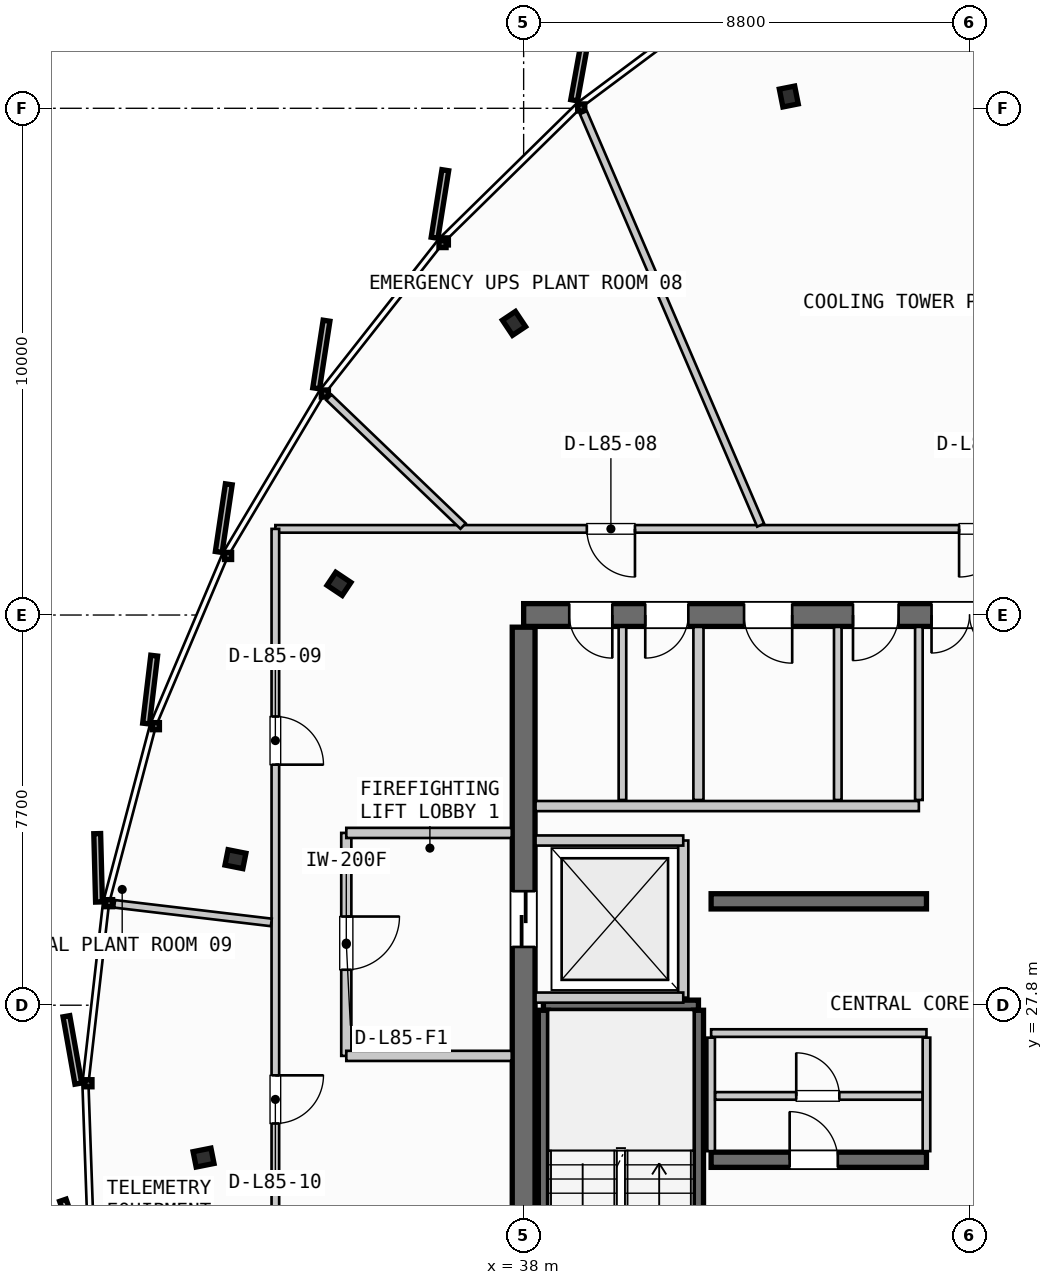
"""IFC4 building model, lengths in metres.
Left out: names, types, materials, properties, quantities, classifications, styles, units other than length and angle.
Written with IfcOpenShell. Run it as: python <this file> out.ifc"""

import sys

from ifc_helpers import new_model, si_unit, direction, frame, frame_2d, origin, origin_2d, place, context, subcontext, project, spatial, rectangle, i_section, extrude, source, transform, mapped, element, fill, save


model = new_model("IFC4")
c1 = context("Model", 3, precision=1e-05, world=origin(), true_north=direction((0.0, 1.0)))
c2 = subcontext(c1, "Body", "Model", "MODEL_VIEW")
j1 = project(units=[si_unit("LENGTHUNIT", "METRE"), si_unit("PLANEANGLEUNIT", "RADIAN")], contexts=[c1])
p1 = place(None, origin())
s1 = spatial("IfcSite", under=j1, at=p1, CompositionType="ELEMENT")
p2 = place(p1, origin())
s2 = spatial("IfcBuilding", under=s1, at=p2, CompositionType="ELEMENT")
p3 = place(p2, frame((0.0, 0.0, 320.3)))
s3 = spatial("IfcBuildingStorey", under=s2, at=p3, CompositionType="ELEMENT", Elevation=320.3)
p4 = place(p3, frame((55.6, 35.5, 0.0), z_axis=(0.0, 0.0, 1.0), x_axis=(-1.0, 0.0, 0.0)))
e1 = element("IfcWall", 1, at=p4, inside=s3, PredefinedType="SHEAR", context=c2, shape_type="SweptSolid", body=[
    extrude(rectangle(XDim=17.6, YDim=0.45, at=frame_2d((8.8, 0.0))), origin(), (0.0, 0.0, 1.0), 3.735),
])
p5 = place(p4, frame((8.05, 0.0, 0.0)))
e2 = element("IfcOpeningElement", 2, at=p5, cuts=e1, PredefinedType="OPENING", context=c2, shape_type="SweptSolid", body=[
    extrude(rectangle(XDim=1.5, YDim=2.2, at=frame_2d((0.75, 1.1))), frame((0.0, 0.235, 0.0), z_axis=(0.0, -1.0, 0.0), x_axis=(1.0, 0.0, 0.0)), (0.0, 0.0, 1.0), 0.47),
])
p6 = place(p4, frame((15.85, 0.0, 0.0)))
e3 = element("IfcOpeningElement", 3, at=p6, cuts=e1, PredefinedType="OPENING", context=c2, shape_type="SweptSolid", body=[
    extrude(rectangle(XDim=0.85, YDim=2.15, at=frame_2d((0.425, 1.075))), frame((0.0, 0.235, 0.0), z_axis=(0.0, -1.0, 0.0), x_axis=(1.0, 0.0, 0.0)), (0.0, 0.0, 1.0), 0.47),
])
p7 = place(p4, frame((14.35, 0.0, 0.0)))
e4 = element("IfcOpeningElement", 4, at=p7, cuts=e1, PredefinedType="OPENING", context=c2, shape_type="SweptSolid", body=[
    extrude(rectangle(XDim=0.85, YDim=2.15, at=frame_2d((0.425, 1.075))), frame((0.0, 0.235, 0.0), z_axis=(0.0, -1.0, 0.0), x_axis=(1.0, 0.0, 0.0)), (0.0, 0.0, 1.0), 0.47),
])
p8 = place(p4, frame((12.3, 0.0, 0.0)))
e5 = element("IfcOpeningElement", 5, at=p8, cuts=e1, PredefinedType="OPENING", context=c2, shape_type="SweptSolid", body=[
    extrude(rectangle(XDim=0.95, YDim=2.15, at=frame_2d((0.475, 1.075))), frame((0.0, 0.235, 0.0), z_axis=(0.0, -1.0, 0.0), x_axis=(1.0, 0.0, 0.0)), (0.0, 0.0, 1.0), 0.47),
])
p9 = place(p4, frame((10.2, 0.0, 0.0)))
e6 = element("IfcOpeningElement", 6, at=p9, cuts=e1, PredefinedType="OPENING", context=c2, shape_type="SweptSolid", body=[
    extrude(rectangle(XDim=0.9, YDim=2.15, at=frame_2d((0.45, 1.075))), frame((0.0, 0.235, 0.0), z_axis=(0.0, -1.0, 0.0), x_axis=(1.0, 0.0, 0.0)), (0.0, 0.0, 1.0), 0.47),
])
p10 = place(p3, frame((38.0, 35.26, 0.0), z_axis=(0.0, 0.0, 1.0), x_axis=(0.0, -1.0, 0.0)))
e7 = element("IfcWall", 7, at=p10, inside=s3, PredefinedType="SHEAR", context=c2, shape_type="SweptSolid", body=[
    extrude(rectangle(XDim=14.92, YDim=0.45, at=frame_2d((7.46, 0.0))), origin(), (0.0, 0.0, 1.0), 3.735),
])
p11 = place(p10, frame((5.21, 0.0, 0.0)))
e8 = element("IfcOpeningElement", 8, at=p11, cuts=e7, PredefinedType="OPENING", context=c2, shape_type="SweptSolid", body=[
    extrude(rectangle(XDim=1.1, YDim=2.2, at=frame_2d((0.55, 1.1))), frame((0.0, 0.235, 0.0), z_axis=(0.0, -1.0, 0.0), x_axis=(1.0, 0.0, 0.0)), (0.0, 0.0, 1.0), 0.47),
])
p12 = place(p3, frame((41.7, 24.75, 0.0), z_axis=(0.0, 0.0, 1.0), x_axis=(1.0, 0.0, 0.0)))
e9 = element("IfcWall", 9, at=p12, inside=s3, PredefinedType="SHEAR", context=c2, shape_type="SweptSolid", body=[
    extrude(rectangle(XDim=4.25, YDim=0.3, at=frame_2d((2.125, 0.0))), origin(), (0.0, 0.0, 1.0), 3.735),
])
p13 = place(p12, frame((1.55, 0.0, 0.0)))
e10 = element("IfcOpeningElement", 10, at=p13, cuts=e9, PredefinedType="OPENING", context=c2, shape_type="SweptSolid", body=[
    extrude(rectangle(XDim=0.95, YDim=2.15, at=frame_2d((0.475, 1.075))), frame((0.0, 0.16, 0.0), z_axis=(0.0, -1.0, 0.0), x_axis=(1.0, 0.0, 0.0)), (0.0, 0.0, 1.0), 0.32),
])
p14 = place(p3, frame((41.7, 29.85, 0.0), z_axis=(0.0, 0.0, 1.0), x_axis=(1.0, 0.0, 0.0)))
e11 = element("IfcWall", 11, at=p14, inside=s3, PredefinedType="SHEAR", context=c2, shape_type="SweptSolid", body=[
    extrude(rectangle(XDim=4.25, YDim=0.3, at=frame_2d((2.125, 0.0))), origin(), (0.0, 0.0, 1.0), 3.735),
])
m1 = source(origin(), c2, "Body", "SweptSolid", [
    extrude(i_section(OverallWidth=0.309, OverallDepth=0.359, WebThickness=0.016, FlangeThickness=0.026, FilletRadius=0.027, at=origin_2d()), origin(), (0.0, 0.0, 1.0), 3.735),
])
for number, where, z_axis, x_axis in (
    (12, (43.233, 45.732, 0.0), (0.0, 0.0, 1.0), (-0.195, 0.981, 0.0)),
    (13, (37.81, 41.255, 0.0), (0.0, 0.0, 1.0), (-0.556, 0.831, 0.0)),
    (14, (34.356, 36.115, 0.0), (0.0, 0.0, 1.0), (-0.831, 0.556, 0.0)),
    (15, (32.312, 30.682, 0.0), (0.0, 0.0, 1.0), (-0.981, 0.195, 0.0)),
    (16, (31.683, 24.793, 0.0), (0.0, 0.0, 1.0), (-0.981, -0.195, 0.0)),
):
    element("IfcColumn", number, at=place(p3, frame(where, z_axis=z_axis, x_axis=x_axis)), inside=s3, PredefinedType="COLUMN", context=c2, shape_type="MappedRepresentation", body=[
        mapped(m1, transform((0.0, 0.0, 0.0), scale=1.0)),
    ])
p15 = place(p3, frame((38.39, 27.8, 0.0), z_axis=(0.0, 0.0, 1.0), x_axis=(1.0, 0.0, 0.0)))
e17 = element("IfcWall", 17, at=p15, inside=s3, PredefinedType="SHEAR", context=c2, shape_type="SweptSolid", body=[
    extrude(rectangle(XDim=3.06, YDim=0.2, at=frame_2d((1.53, 0.0))), origin(), (0.0, 0.0, 1.0), 3.735),
])
for number, where, z_axis, x_axis in (
    (18, (41.45, 27.7, 0.0), (0.0, 0.0, 1.0), (0.0, -1.0, 0.0)),
    (19, (38.39, 20.35, 0.0), (0.0, 0.0, 1.0), (0.0, 1.0, 0.0)),
):
    element("IfcWall", number, at=place(p3, frame(where, z_axis=z_axis, x_axis=x_axis)), inside=s3, PredefinedType="SHEAR", context=c2, shape_type="SweptSolid", body=[
        extrude(rectangle(XDim=7.35, YDim=0.2, at=frame_2d((3.675, 0.0))), origin(), (0.0, 0.0, 1.0), 3.735),
    ])
p16 = place(p3, frame((41.15, 27.95, 0.0), z_axis=(0.0, 0.0, 1.0), x_axis=(0.0, 1.0, 0.0)))
e20 = element("IfcWall", 20, at=p16, inside=s3, PredefinedType="PARTITIONING", context=c2, shape_type="SweptSolid", body=[
    extrude(rectangle(XDim=3.1, YDim=0.2, at=frame_2d((1.55, 0.0))), origin(), (0.0, 0.0, 1.0), 3.26),
])
for number, where, z_axis, x_axis in (
    (21, (38.235, 27.95, 0.0), (0.0, 0.0, 1.0), (1.0, 0.0, 0.0)),
    (22, (38.235, 31.05, 0.0), (0.0, 0.0, 1.0), (1.0, 0.0, 0.0)),
):
    element("IfcWall", number, at=place(p3, frame(where, z_axis=z_axis, x_axis=x_axis)), inside=s3, PredefinedType="PARTITIONING", context=c2, shape_type="SweptSolid", body=[
        extrude(rectangle(XDim=2.915, YDim=0.2, at=frame_2d((1.458, 0.0))), origin(), (0.0, 0.0, 1.0), 3.26),
    ])
p17 = place(p3, frame((34.5, 31.2, 0.0), z_axis=(0.0, 0.0, 1.0), x_axis=(0.0, -1.0, 0.0)))
e23 = element("IfcWall", 23, at=p17, inside=s3, PredefinedType="PARTITIONING", context=c2, shape_type="SweptSolid", body=[
    extrude(rectangle(XDim=4.4, YDim=0.2, at=frame_2d((2.2, 0.0))), origin(), (0.0, 0.0, 1.0), 3.26),
])
p18 = place(p17, frame((1.65, 0.0, 0.0)))
e24 = element("IfcOpeningElement", 24, at=p18, cuts=e23, PredefinedType="OPENING", context=c2, shape_type="SweptSolid", body=[
    extrude(rectangle(XDim=1.05, YDim=2.15, at=frame_2d((0.525, 1.075))), frame((0.0, 0.11, 0.0), z_axis=(0.0, -1.0, 0.0), x_axis=(1.0, 0.0, 0.0)), (0.0, 0.0, 1.0), 0.22),
])
for number, where, z_axis, x_axis in (
    (25, (34.5, 26.8, 0.0), (0.0, 0.0, 1.0), (1.0, 0.0, 0.0)),
    (26, (34.5, 31.2, 0.0), (0.0, 0.0, 1.0), (1.0, 0.0, 0.0)),
):
    element("IfcWall", number, at=place(p3, frame(where, z_axis=z_axis, x_axis=x_axis)), inside=s3, PredefinedType="PARTITIONING", context=c2, shape_type="SweptSolid", body=[
        extrude(rectangle(XDim=3.265, YDim=0.2, at=frame_2d((1.632, 0.0))), origin(), (0.0, 0.0, 1.0), 3.26),
    ])
p19 = place(p3, frame((41.7, 27.25, 0.0), z_axis=(0.0, 0.0, 1.0), x_axis=(1.0, 0.0, 0.0)))
e27 = element("IfcWall", 27, at=p19, inside=s3, PredefinedType="PARTITIONING", context=c2, shape_type="SweptSolid", body=[
    extrude(rectangle(XDim=4.25, YDim=0.15, at=frame_2d((2.125, 0.0))), origin(), (0.0, 0.0, 1.0), 3.26),
])
for number, where, z_axis, x_axis in (
    (28, (41.7, 24.92, 0.0), (0.0, 0.0, 1.0), (0.0, 1.0, 0.0)),
    (29, (45.95, 24.92, 0.0), (0.0, 0.0, 1.0), (0.0, 1.0, 0.0)),
):
    element("IfcWall", number, at=place(p3, frame(where, z_axis=z_axis, x_axis=x_axis)), inside=s3, PredefinedType="PARTITIONING", context=c2, shape_type="SweptSolid", body=[
        extrude(rectangle(XDim=2.24, YDim=0.15, at=frame_2d((1.12, 0.0))), origin(), (0.0, 0.0, 1.0), 3.26),
    ])
p20 = place(p3, frame((41.78, 26.01, 0.0), z_axis=(0.0, 0.0, 1.0), x_axis=(1.0, 0.0, 0.0)))
e30 = element("IfcWall", 30, at=p20, inside=s3, PredefinedType="PARTITIONING", context=c2, shape_type="SweptSolid", body=[
    extrude(rectangle(XDim=4.09, YDim=0.15, at=frame_2d((2.045, 0.0))), origin(), (0.0, 0.0, 1.0), 3.26),
])
p21 = place(p20, frame((1.6, 0.0, 0.0)))
e31 = element("IfcOpeningElement", 31, at=p21, cuts=e30, PredefinedType="OPENING", context=c2, shape_type="SweptSolid", body=[
    extrude(rectangle(XDim=0.85, YDim=2.15, at=frame_2d((0.425, 1.075))), frame((0.0, 0.085, 0.0), z_axis=(0.0, -1.0, 0.0), x_axis=(1.0, 0.0, 0.0)), (0.0, 0.0, 1.0), 0.17),
])
p22 = place(p3, frame((41.45, 31.85, 0.0), z_axis=(0.0, 0.0, 1.0), x_axis=(0.0, 1.0, 0.0)))
e32 = element("IfcWall", 32, at=p22, inside=s3, PredefinedType="PARTITIONING", context=c2, shape_type="SweptSolid", body=[
    extrude(rectangle(XDim=3.415, YDim=0.2, at=frame_2d((1.708, 0.0))), origin(), (0.0, 0.0, 1.0), 3.26),
])
p23 = place(p3, frame((38.235, 31.73, 0.0), z_axis=(0.0, 0.0, 1.0), x_axis=(1.0, 0.0, 0.0)))
e33 = element("IfcWall", 33, at=p23, inside=s3, PredefinedType="PARTITIONING", context=c2, shape_type="SweptSolid", body=[
    extrude(rectangle(XDim=7.565, YDim=0.2, at=frame_2d((3.782, 0.0))), origin(), (0.0, 0.0, 1.0), 3.26),
])
for number, where, z_axis, x_axis in (
    (34, (45.8, 31.85, 0.0), (0.0, 0.0, 1.0), (0.0, 1.0, 0.0)),
    (35, (39.95, 31.85, 0.0), (0.0, 0.0, 1.0), (0.0, 1.0, 0.0)),
):
    element("IfcWall", number, at=place(p3, frame(where, z_axis=z_axis, x_axis=x_axis)), inside=s3, PredefinedType="PARTITIONING", context=c2, shape_type="SweptSolid", body=[
        extrude(rectangle(XDim=3.415, YDim=0.15, at=frame_2d((1.708, 0.0))), origin(), (0.0, 0.0, 1.0), 3.26),
    ])
p24 = place(p3, frame((44.2, 31.85, 0.0), z_axis=(0.0, 0.0, 1.0), x_axis=(0.0, 1.0, 0.0)))
e36 = element("IfcWall", 36, at=p24, inside=s3, PredefinedType="PLUMBINGWALL", context=c2, shape_type="SweptSolid", body=[
    extrude(rectangle(XDim=3.415, YDim=0.15, at=frame_2d((1.708, 0.0))), origin(), (0.0, 0.0, 1.0), 3.26),
])
p25 = place(p3, frame((60.5, 37.2, 0.0), z_axis=(0.0, 0.0, 1.0), x_axis=(-1.0, 0.0, 0.0)))
e37 = element("IfcWall", 37, at=p25, inside=s3, PredefinedType="PARTITIONING", context=c2, shape_type="SweptSolid", body=[
    extrude(rectangle(XDim=27.4, YDim=0.15, at=frame_2d((13.7, 0.0))), origin(), (0.0, 0.0, 1.0), 3.26),
])
p26 = place(p25, frame((4.995, 0.0, 0.0)))
e38 = element("IfcOpeningElement", 38, at=p26, cuts=e37, PredefinedType="OPENING", context=c2, shape_type="SweptSolid", body=[
    extrude(rectangle(XDim=0.95, YDim=2.15, at=frame_2d((0.475, 1.075))), frame((0.0, 0.085, 0.0), z_axis=(0.0, -1.0, 0.0), x_axis=(1.0, 0.0, 0.0)), (0.0, 0.0, 1.0), 0.17),
])
p27 = place(p25, frame((12.956, 0.0, 0.0)))
e39 = element("IfcOpeningElement", 39, at=p27, cuts=e37, PredefinedType="OPENING", context=c2, shape_type="SweptSolid", body=[
    extrude(rectangle(XDim=0.95, YDim=2.15, at=frame_2d((0.475, 1.075))), frame((0.0, 0.085, 0.0), z_axis=(0.0, -1.0, 0.0), x_axis=(1.0, 0.0, 0.0)), (0.0, 0.0, 1.0), 0.17),
])
p28 = place(p25, frame((20.303, 0.0, 0.0)))
e40 = element("IfcOpeningElement", 40, at=p28, cuts=e37, PredefinedType="OPENING", context=c2, shape_type="SweptSolid", body=[
    extrude(rectangle(XDim=0.95, YDim=2.15, at=frame_2d((0.475, 1.075))), frame((0.0, 0.085, 0.0), z_axis=(0.0, -1.0, 0.0), x_axis=(1.0, 0.0, 0.0)), (0.0, 0.0, 1.0), 0.17),
])
p29 = place(p3, frame((33.1, 37.2, 0.0), z_axis=(0.0, 0.0, 1.0), x_axis=(0.0, -1.0, 0.0)))
e41 = element("IfcWall", 41, at=p29, inside=s3, PredefinedType="PARTITIONING", context=c2, shape_type="SweptSolid", body=[
    extrude(rectangle(XDim=18.8, YDim=0.15, at=frame_2d((9.4, 0.0))), origin(), (0.0, 0.0, 1.0), 3.26),
])
p30 = place(p29, frame((3.703, 0.0, 0.0)))
e42 = element("IfcOpeningElement", 42, at=p30, cuts=e41, PredefinedType="OPENING", context=c2, shape_type="SweptSolid", body=[
    extrude(rectangle(XDim=0.95, YDim=2.15, at=frame_2d((0.475, 1.075))), frame((0.0, 0.085, 0.0), z_axis=(0.0, -1.0, 0.0), x_axis=(1.0, 0.0, 0.0)), (0.0, 0.0, 1.0), 0.17),
])
p31 = place(p29, frame((10.784, 0.0, 0.0)))
e43 = element("IfcOpeningElement", 43, at=p31, cuts=e41, PredefinedType="OPENING", context=c2, shape_type="SweptSolid", body=[
    extrude(rectangle(XDim=0.95, YDim=2.15, at=frame_2d((0.475, 1.075))), frame((0.0, 0.085, 0.0), z_axis=(0.0, -1.0, 0.0), x_axis=(1.0, 0.0, 0.0)), (0.0, 0.0, 1.0), 0.17),
])
p32 = place(p3, frame((42.677, 37.273, 0.0), z_axis=(0.0, 0.0, 1.0), x_axis=(-0.394697293261, 0.918811213848, 0.0)))
e44 = element("IfcWall", 44, at=p32, inside=s3, PredefinedType="PARTITIONING", context=c2, shape_type="SweptSolid", body=[
    extrude(rectangle(XDim=8.861, YDim=0.15, at=frame_2d((4.43, 0.0))), origin(), (0.0, 0.0, 1.0), 3.26),
])
p33 = place(p3, frame((36.805, 37.255, 0.0), z_axis=(0.0, 0.0, 1.0), x_axis=(-0.721787379601, 0.692114859433, 0.0)))
e45 = element("IfcWall", 45, at=p33, inside=s3, PredefinedType="PARTITIONING", context=c2, shape_type="SweptSolid", body=[
    extrude(rectangle(XDim=3.67, YDim=0.15, at=frame_2d((1.835, 0.0))), origin(), (0.0, 0.0, 1.0), 3.26),
])
p34 = place(p3, frame((33.021, 29.434, 0.0), z_axis=(0.0, 0.0, 1.0), x_axis=(-0.993026995763, 0.117887173544, 0.0)))
e46 = element("IfcWall", 46, at=p34, inside=s3, PredefinedType="PARTITIONING", context=c2, shape_type="SweptSolid", body=[
    extrude(rectangle(XDim=3.115, YDim=0.15, at=frame_2d((1.557, 0.0))), origin(), (0.0, 0.0, 1.0), 3.26),
])
m2 = source(origin(), c2, "Body", "SweptSolid", [
    extrude(rectangle(XDim=1.5, YDim=2.2, at=frame_2d((0.75, 1.1))), frame((0.0, 0.025, 0.0), z_axis=(0.0, -1.0, 0.0), x_axis=(1.0, 0.0, 0.0)), (0.0, 0.0, 1.0), 0.05),
])
p35 = place(p5, origin())
e47 = element("IfcDoor", 47, at=p35, inside=s3, OperationType="DOUBLE_DOOR_SINGLE_SWING", PredefinedType="DOOR", context=c2, shape_type="MappedRepresentation", body=[
    mapped(m2, transform((0.0, 0.0, 0.0), scale=1.0)),
])
fill(e2, e47)
m3 = source(origin(), c2, "Body", "SweptSolid", [
    extrude(rectangle(XDim=1.1, YDim=2.2, at=frame_2d((0.55, 1.1))), frame((0.0, 0.025, 0.0), z_axis=(0.0, -1.0, 0.0), x_axis=(1.0, 0.0, 0.0)), (0.0, 0.0, 1.0), 0.05),
])
p36 = place(p11, origin())
e48 = element("IfcDoor", 48, at=p36, inside=s3, OperationType="SLIDING_TO_LEFT", PredefinedType="DOOR", context=c2, shape_type="MappedRepresentation", body=[
    mapped(m3, transform((0.0, 0.0, 0.0), scale=1.0)),
])
fill(e8, e48)
m4 = source(origin(), c2, "Body", "SweptSolid", [
    extrude(rectangle(XDim=0.95, YDim=2.15, at=frame_2d((0.475, 1.075))), frame((0.0, 0.025, 0.0), z_axis=(0.0, -1.0, 0.0), x_axis=(1.0, 0.0, 0.0)), (0.0, 0.0, 1.0), 0.05),
])
p37 = place(p13, origin())
e49 = element("IfcDoor", 49, at=p37, inside=s3, OperationType="SINGLE_SWING_LEFT", PredefinedType="DOOR", context=c2, shape_type="MappedRepresentation", body=[
    mapped(m4, transform((0.0, 0.0, 0.0), scale=1.0)),
])
fill(e10, e49)
m5 = source(origin(), c2, "Body", "SweptSolid", [
    extrude(rectangle(XDim=0.85, YDim=2.15, at=frame_2d((0.425, 1.075))), frame((0.0, 0.025, 0.0), z_axis=(0.0, -1.0, 0.0), x_axis=(1.0, 0.0, 0.0)), (0.0, 0.0, 1.0), 0.05),
])
p38 = place(p6, origin())
e50 = element("IfcDoor", 50, at=p38, inside=s3, OperationType="SINGLE_SWING_LEFT", PredefinedType="DOOR", context=c2, shape_type="MappedRepresentation", body=[
    mapped(m5, transform((0.0, 0.0, 0.0), scale=1.0)),
])
fill(e3, e50)
p39 = place(p7, origin())
e51 = element("IfcDoor", 51, at=p39, inside=s3, OperationType="SINGLE_SWING_RIGHT", PredefinedType="DOOR", context=c2, shape_type="MappedRepresentation", body=[
    mapped(m5, transform((0.0, 0.0, 0.0), scale=1.0)),
])
fill(e4, e51)
p40 = place(p8, origin())
e52 = element("IfcDoor", 52, at=p40, inside=s3, OperationType="SINGLE_SWING_LEFT", PredefinedType="DOOR", context=c2, shape_type="MappedRepresentation", body=[
    mapped(m4, transform((0.0, 0.0, 0.0), scale=1.0)),
])
fill(e5, e52)
m6 = source(origin(), c2, "Body", "SweptSolid", [
    extrude(rectangle(XDim=0.9, YDim=2.15, at=frame_2d((0.45, 1.075))), frame((0.0, 0.025, 0.0), z_axis=(0.0, -1.0, 0.0), x_axis=(1.0, 0.0, 0.0)), (0.0, 0.0, 1.0), 0.05),
])
p41 = place(p9, origin())
e53 = element("IfcDoor", 53, at=p41, inside=s3, OperationType="SINGLE_SWING_RIGHT", PredefinedType="DOOR", context=c2, shape_type="MappedRepresentation", body=[
    mapped(m6, transform((0.0, 0.0, 0.0), scale=1.0)),
])
fill(e6, e53)
m7 = source(origin(), c2, "Body", "SweptSolid", [
    extrude(rectangle(XDim=1.05, YDim=2.15, at=frame_2d((0.525, 1.075))), frame((0.0, 0.025, 0.0), z_axis=(0.0, -1.0, 0.0), x_axis=(1.0, 0.0, 0.0)), (0.0, 0.0, 1.0), 0.05),
])
p42 = place(p18, origin())
e54 = element("IfcDoor", 54, at=p42, inside=s3, OperationType="SINGLE_SWING_LEFT", PredefinedType="DOOR", context=c2, shape_type="MappedRepresentation", body=[
    mapped(m7, transform((0.0, 0.0, 0.0), scale=1.0)),
])
fill(e24, e54)
p43 = place(p21, origin())
e55 = element("IfcDoor", 55, at=p43, inside=s3, OperationType="SINGLE_SWING_LEFT", PredefinedType="DOOR", context=c2, shape_type="MappedRepresentation", body=[
    mapped(m5, transform((0.0, 0.0, 0.0), scale=1.0)),
])
fill(e31, e55)
p44 = place(p27, origin())
e56 = element("IfcDoor", 56, at=p44, inside=s3, OperationType="SINGLE_SWING_RIGHT", PredefinedType="DOOR", context=c2, shape_type="MappedRepresentation", body=[
    mapped(m4, transform((0.0, 0.0, 0.0), scale=1.0)),
])
fill(e39, e56)
p45 = place(p28, origin())
e57 = element("IfcDoor", 57, at=p45, inside=s3, OperationType="SINGLE_SWING_LEFT", PredefinedType="DOOR", context=c2, shape_type="MappedRepresentation", body=[
    mapped(m4, transform((0.0, 0.0, 0.0), scale=1.0)),
])
fill(e40, e57)
p46 = place(p30, origin())
e58 = element("IfcDoor", 58, at=p46, inside=s3, OperationType="SINGLE_SWING_RIGHT", PredefinedType="DOOR", context=c2, shape_type="MappedRepresentation", body=[
    mapped(m4, transform((0.0, 0.0, 0.0), scale=1.0)),
])
fill(e42, e58)
p47 = place(p31, origin())
e59 = element("IfcDoor", 59, at=p47, inside=s3, OperationType="SINGLE_SWING_LEFT", PredefinedType="DOOR", context=c2, shape_type="MappedRepresentation", body=[
    mapped(m4, transform((0.0, 0.0, 0.0), scale=1.0)),
])
fill(e43, e59)
save(model, sys.argv[1])
